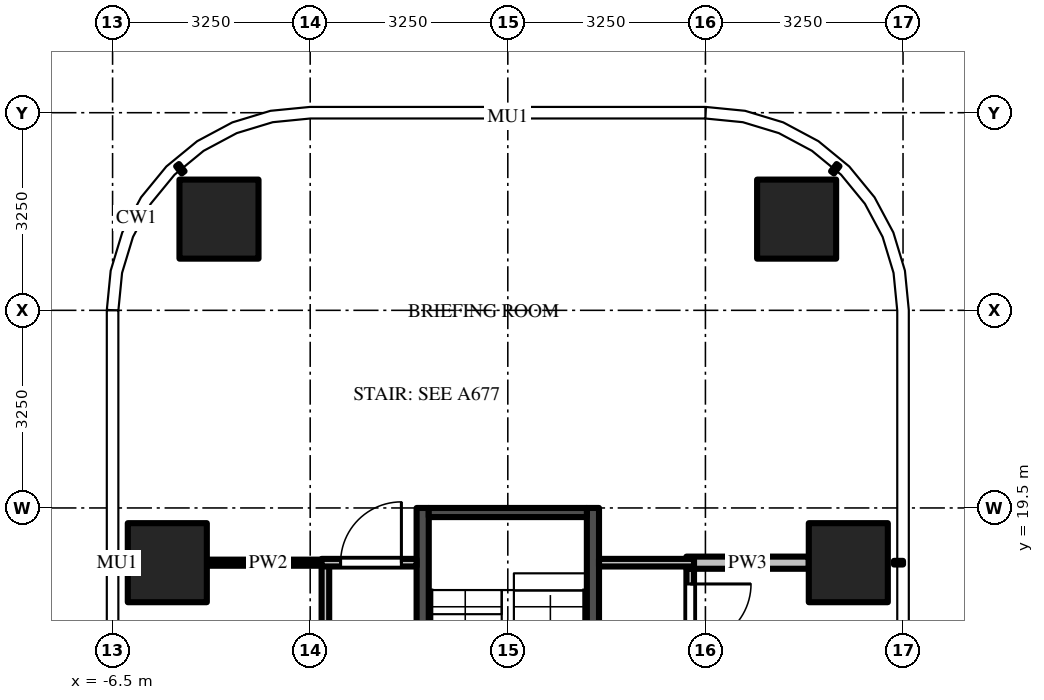
"""IFC4 building model, lengths in metres.
Left out: names, types, materials, properties, quantities, classifications, styles, units other than length and angle.
Written with IfcOpenShell. Run it as: python <this file> out.ifc"""

import sys

from ifc_helpers import new_model, si_unit, direction, frame, frame_2d, origin, origin_2d, place, context, subcontext, project, spatial, rectangle, extrude, source, transform, mapped, element, fill, save


model = new_model("IFC4")
c1 = context("Model", 3, precision=1e-05, world=origin(), true_north=direction((0.0, 1.0)))
c2 = subcontext(c1, "Body", "Model", "MODEL_VIEW")
j1 = project(units=[si_unit("LENGTHUNIT", "METRE"), si_unit("PLANEANGLEUNIT", "RADIAN")], contexts=[c1])
p1 = place(None, origin())
s1 = spatial("IfcSite", under=j1, at=p1, CompositionType="ELEMENT")
p2 = place(p1, origin())
s2 = spatial("IfcBuilding", under=s1, at=p2, CompositionType="ELEMENT")
p3 = place(p2, frame((0.0, 0.0, 102.0)))
s3 = spatial("IfcBuildingStorey", under=s2, at=p3, CompositionType="ELEMENT", Elevation=102.0)
m1 = source(origin(), c2, "Body", "SweptSolid", [
    extrude(rectangle(XDim=1.3, YDim=1.3, at=origin_2d()), origin(), (0.0, 0.0, 1.0), 4.5),
])
for number, where, z_axis, x_axis in (
    (1, (-5.6, 18.6, 0.0), (0.0, 0.0, 1.0), (1.0, 0.0, 0.0)),
    (2, (-4.75, 24.25, 0.0), (0.0, 0.0, 1.0), (1.0, 0.0, 0.0)),
    (3, (5.6, 18.6, 0.0), (0.0, 0.0, 1.0), (1.0, 0.0, 0.0)),
    (4, (4.75, 24.25, 0.0), (0.0, 0.0, 1.0), (1.0, 0.0, 0.0)),
):
    element("IfcColumn", number, at=place(p3, frame(where, z_axis=z_axis, x_axis=x_axis)), inside=s3, PredefinedType="COLUMN", context=c2, shape_type="MappedRepresentation", body=[
        mapped(m1, transform((0.0, 0.0, 0.0))),
    ])
m2 = source(origin(), c2, "Body", "SweptSolid", [
    extrude(rectangle(XDim=6.0, YDim=0.2, at=frame_2d((3.0, 0.0))), origin(), (0.0, 0.0, 1.0), 4.25),
])
for number, where, z_axis, x_axis in (
    (5, (-1.4, 13.5, 0.0), (0.0, 0.0, 1.0), (0.0, 1.0, 0.0)),
    (6, (1.4, 13.5, 0.0), (0.0, 0.0, 1.0), (0.0, 1.0, 0.0)),
):
    element("IfcWall", number, at=place(p3, frame(where, z_axis=z_axis, x_axis=x_axis)), inside=s3, PredefinedType="SHEAR", context=c2, shape_type="MappedRepresentation", body=[
        mapped(m2, transform((0.0, 0.0, 0.0))),
    ])
m3 = source(origin(), c2, "Body", "SweptSolid", [
    extrude(rectangle(XDim=2.6, YDim=0.15, at=frame_2d((1.3, 0.0))), origin(), (0.0, 0.0, 1.0), 4.25),
])
p4 = place(p3, frame((-1.3, 19.425, 0.0), z_axis=(0.0, 0.0, 1.0), x_axis=(1.0, 0.0, 0.0)))
e7 = element("IfcWall", 7, at=p4, inside=s3, PredefinedType="SHEAR", context=c2, shape_type="MappedRepresentation", body=[
    mapped(m3, transform((0.0, 0.0, 0.0))),
])
m4 = source(origin(), c2, "Body", "SweptSolid", [
    extrude(rectangle(XDim=6.387, YDim=0.125, at=frame_2d((3.194, 0.0))), origin(), (0.0, 0.0, 1.0), 3.468),
])
p5 = place(p3, frame((-3.0, 12.163, 0.0), z_axis=(0.0, 0.0, 1.0), x_axis=(0.0, 1.0, 0.0)))
e8 = element("IfcWall", 8, at=p5, inside=s3, PredefinedType="PARTITIONING", context=c2, shape_type="MappedRepresentation", body=[
    mapped(m4, transform((0.0, 0.0, 0.0))),
])
m5 = source(origin(), c2, "Body", "SweptSolid", [
    extrude(rectangle(XDim=6.3, YDim=0.125, at=frame_2d((3.15, 0.0))), origin(), (0.0, 0.0, 1.0), 3.468),
])
p6 = place(p3, frame((3.0, 18.5, 0.0), z_axis=(0.0, 0.0, 1.0), x_axis=(0.0, -1.0, 0.0)))
e9 = element("IfcWall", 9, at=p6, inside=s3, PredefinedType="PARTITIONING", context=c2, shape_type="MappedRepresentation", body=[
    mapped(m5, transform((0.0, 0.0, 0.0))),
])
m6 = source(origin(), c2, "Body", "SweptSolid", [
    extrude(rectangle(XDim=1.0, YDim=2.1, at=frame_2d((0.5, 1.05))), frame((0.0, 0.073, 0.0), z_axis=(0.0, -1.0, 0.0), x_axis=(1.0, 0.0, 0.0)), (0.0, 0.0, 1.0), 0.145),
])
p7 = place(p6, frame((0.25, 0.0, 0.0)))
e10 = element("IfcOpeningElement", 10, at=p7, cuts=e9, PredefinedType="OPENING", context=c2, shape_type="MappedRepresentation", body=[
    mapped(m6, transform((0.0, 0.0, 0.0))),
])
m7 = source(origin(), c2, "Body", "SweptSolid", [
    extrude(rectangle(XDim=2.012, YDim=0.2, at=frame_2d((1.006, 0.0))), origin(), (0.0, 0.0, 1.0), 3.697),
])
p8 = place(p3, frame((2.938, 18.6, 0.0), z_axis=(0.0, 0.0, 1.0), x_axis=(1.0, 0.0, 0.0)))
e11 = element("IfcWall", 11, at=p8, inside=s3, PredefinedType="PARTITIONING", context=c2, shape_type="MappedRepresentation", body=[
    mapped(m7, transform((0.0, 0.0, 0.0))),
])
m8 = source(origin(), c2, "Body", "SweptSolid", [
    extrude(rectangle(XDim=2.012, YDim=0.1, at=frame_2d((1.006, 0.0))), origin(), (0.0, 0.0, 1.0), 3.697),
])
p9 = place(p3, frame((-4.95, 18.6, 0.0), z_axis=(0.0, 0.0, 1.0), x_axis=(1.0, 0.0, 0.0)))
e12 = element("IfcWall", 12, at=p9, inside=s3, PredefinedType="PARTITIONING", context=c2, shape_type="MappedRepresentation", body=[
    mapped(m8, transform((0.0, 0.0, 0.0))),
])
m9 = source(origin(), c2, "Body", "SweptSolid", [
    extrude(rectangle(XDim=1.562, YDim=0.125, at=frame_2d((0.781, 0.0))), origin(), (0.0, 0.0, 1.0), 3.697),
])
p10 = place(p3, frame((-3.062, 18.6, 0.0), z_axis=(0.0, 0.0, 1.0), x_axis=(1.0, 0.0, 0.0)))
e13 = element("IfcWall", 13, at=p10, inside=s3, PredefinedType="PARTITIONING", context=c2, shape_type="MappedRepresentation", body=[
    mapped(m9, transform((0.0, 0.0, 0.0))),
])
p11 = place(p10, frame((0.312, 0.0, 0.0)))
e14 = element("IfcOpeningElement", 14, at=p11, cuts=e13, PredefinedType="OPENING", context=c2, shape_type="MappedRepresentation", body=[
    mapped(m6, transform((0.0, 0.0, 0.0))),
])
p12 = place(p3, frame((1.5, 18.6, 0.0), z_axis=(0.0, 0.0, 1.0), x_axis=(1.0, 0.0, 0.0)))
e15 = element("IfcWall", 15, at=p12, inside=s3, PredefinedType="PARTITIONING", context=c2, shape_type="MappedRepresentation", body=[
    mapped(m9, transform((0.0, 0.0, 0.0))),
])
m10 = source(origin(), c2, "Body", "SweptSolid", [
    extrude(rectangle(XDim=1.0, YDim=2.1, at=frame_2d((0.5, 1.05))), frame((0.0, 0.025, 0.0), z_axis=(0.0, -1.0, 0.0), x_axis=(1.0, 0.0, 0.0)), (0.0, 0.0, 1.0), 0.05),
])
p13 = place(p7, origin())
e16 = element("IfcDoor", 16, at=p13, inside=s3, OperationType="SINGLE_SWING_LEFT", PredefinedType="DOOR", context=c2, shape_type="MappedRepresentation", body=[
    mapped(m10, transform((0.0, 0.0, 0.0))),
])
fill(e10, e16)
p14 = place(p11, origin())
e17 = element("IfcDoor", 17, at=p14, inside=s3, OperationType="SINGLE_SWING_RIGHT", PredefinedType="DOOR", context=c2, shape_type="MappedRepresentation", body=[
    mapped(m10, transform((0.0, 0.0, 0.0))),
])
fill(e14, e17)
save(model, sys.argv[1])
